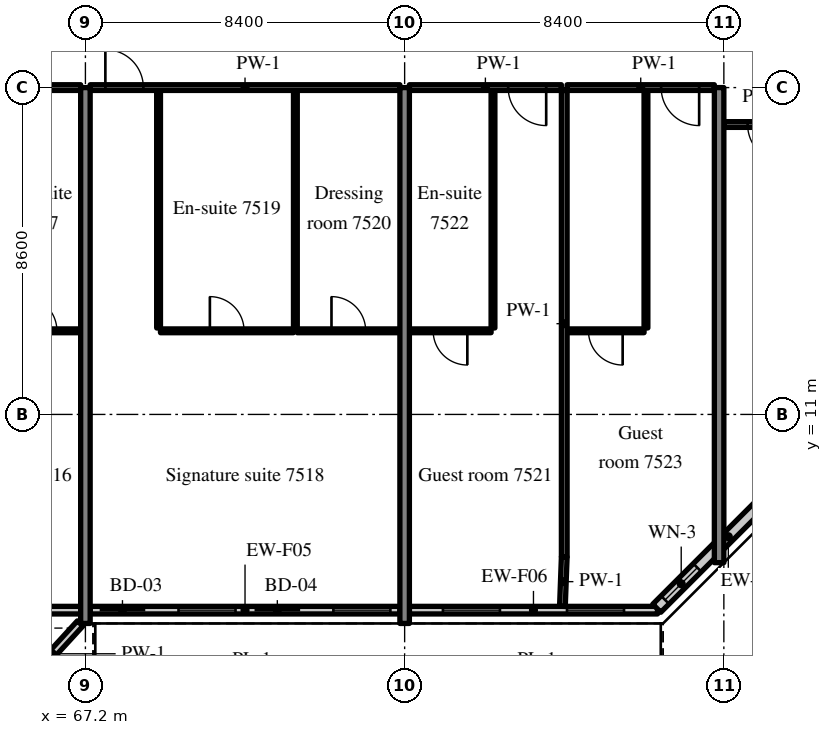
"""IFC4 building model, lengths in metres.
Left out: names, types, materials, properties, quantities, classifications, styles, units other than length and angle.
Written with IfcOpenShell. Run it as: python <this file> out.ifc"""

import sys

from ifc_helpers import new_model, si_unit, direction, frame, frame_2d, origin, place, context, subcontext, project, spatial, rectangle, extrude, source, transform, mapped, element, fill, save


model = new_model("IFC4")
c1 = context("Model", 3, precision=1e-05, world=origin(), true_north=direction((0.0, 1.0)))
c2 = subcontext(c1, "Body", "Model", "MODEL_VIEW")
j1 = project(units=[si_unit("LENGTHUNIT", "METRE"), si_unit("PLANEANGLEUNIT", "RADIAN")], contexts=[c1])
p1 = place(None, origin())
s1 = spatial("IfcSite", under=j1, at=p1, CompositionType="ELEMENT")
p2 = place(p1, origin())
s2 = spatial("IfcBuilding", under=s1, at=p2, CompositionType="ELEMENT")
p3 = place(p2, frame((0.0, 0.0, 313.7)))
s3 = spatial("IfcBuildingStorey", under=s2, at=p3, CompositionType="ELEMENT", Elevation=313.7)
m1 = source(origin(), c2, "Body", "SweptSolid", [
    extrude(rectangle(XDim=14.1, YDim=0.25, at=frame_2d((7.05, 0.0))), origin(), (0.0, 0.0, 1.0), 3.72),
])
for number, where, z_axis, x_axis in (
    (1, (67.2, 5.5, 0.0), (0.0, 0.0, 1.0), (0.0, 1.0, 0.0)),
    (2, (75.6, 5.5, 0.0), (0.0, 0.0, 1.0), (0.0, 1.0, 0.0)),
):
    element("IfcWall", number, at=place(p3, frame(where, z_axis=z_axis, x_axis=x_axis)), inside=s3, PredefinedType="SHEAR", context=c2, shape_type="MappedRepresentation", body=[
        mapped(m1, transform((0.0, 0.0, 0.0), scale=1.0)),
    ])
m2 = source(origin(), c2, "Body", "SweptSolid", [
    extrude(rectangle(XDim=12.5, YDim=0.25, at=frame_2d((6.25, 0.0))), origin(), (0.0, 0.0, 1.0), 3.72),
])
p4 = place(p3, frame((83.875, 7.1, 0.0), z_axis=(0.0, 0.0, 1.0), x_axis=(0.0, 1.0, 0.0)))
e3 = element("IfcWall", 3, at=p4, inside=s3, PredefinedType="SHEAR", context=c2, shape_type="MappedRepresentation", body=[
    mapped(m2, transform((0.0, 0.0, 0.0), scale=1.0)),
])
m3 = source(origin(), c2, "Body", "SweptSolid", [
    extrude(rectangle(XDim=3.642, YDim=0.2, at=frame_2d((1.821, 0.0))), origin(), (0.0, 0.0, 1.0), 3.17),
])
p5 = place(p3, frame((63.433, 5.85, 0.0), z_axis=(0.0, 0.0, 1.0), x_axis=(1.0, 0.0, 0.0)))
e4 = element("IfcWall", 4, at=p5, inside=s3, PredefinedType="SOLIDWALL", context=c2, shape_type="MappedRepresentation", body=[
    mapped(m3, transform((0.0, 0.0, 0.0), scale=1.0)),
])
m4 = source(origin(), c2, "Body", "SweptSolid", [
    extrude(rectangle(XDim=1.5, YDim=1.5, at=frame_2d((0.75, 0.75))), frame((0.0, 0.11, 0.0), z_axis=(0.0, -1.0, 0.0), x_axis=(1.0, 0.0, 0.0)), (0.0, 0.0, 1.0), 0.22),
])
p6 = place(p5, frame((1.071, 0.0, 0.9)))
e5 = element("IfcOpeningElement", 5, at=p6, cuts=e4, PredefinedType="OPENING", context=c2, shape_type="MappedRepresentation", body=[
    mapped(m4, transform((0.0, 0.0, 0.0), scale=1.0)),
])
m5 = source(origin(), c2, "Body", "SweptSolid", [
    extrude(rectangle(XDim=8.15, YDim=0.2, at=frame_2d((4.075, 0.0))), origin(), (0.0, 0.0, 1.0), 3.17),
])
p7 = place(p3, frame((67.325, 5.85, 0.0), z_axis=(0.0, 0.0, 1.0), x_axis=(1.0, 0.0, 0.0)))
e6 = element("IfcWall", 6, at=p7, inside=s3, PredefinedType="SOLIDWALL", context=c2, shape_type="MappedRepresentation", body=[
    mapped(m5, transform((0.0, 0.0, 0.0), scale=1.0)),
])
m6 = source(origin(), c2, "Body", "SweptSolid", [
    extrude(rectangle(XDim=1.2, YDim=2.4, at=frame_2d((0.6, 1.2))), frame((0.0, 0.11, 0.0), z_axis=(0.0, -1.0, 0.0), x_axis=(1.0, 0.0, 0.0)), (0.0, 0.0, 1.0), 0.22),
])
p8 = place(p7, frame((0.25, 0.0, 0.0)))
e7 = element("IfcOpeningElement", 7, at=p8, cuts=e6, PredefinedType="OPENING", context=c2, shape_type="MappedRepresentation", body=[
    mapped(m6, transform((0.0, 0.0, 0.0), scale=1.0)),
])
p9 = place(p7, frame((2.325, 0.0, 0.9)))
e8 = element("IfcOpeningElement", 8, at=p9, cuts=e6, PredefinedType="OPENING", context=c2, shape_type="MappedRepresentation", body=[
    mapped(m4, transform((0.0, 0.0, 0.0), scale=1.0)),
])
p10 = place(p7, frame((4.325, 0.0, 0.0)))
e9 = element("IfcOpeningElement", 9, at=p10, cuts=e6, PredefinedType="OPENING", context=c2, shape_type="MappedRepresentation", body=[
    mapped(m6, transform((0.0, 0.0, 0.0), scale=1.0)),
])
p11 = place(p7, frame((6.4, 0.0, 0.9)))
e10 = element("IfcOpeningElement", 10, at=p11, cuts=e6, PredefinedType="OPENING", context=c2, shape_type="MappedRepresentation", body=[
    mapped(m4, transform((0.0, 0.0, 0.0), scale=1.0)),
])
m7 = source(origin(), c2, "Body", "SweptSolid", [
    extrude(rectangle(XDim=6.53, YDim=0.2, at=frame_2d((3.265, 0.0))), origin(), (0.0, 0.0, 1.0), 3.17),
])
p12 = place(p3, frame((75.725, 5.85, 0.0), z_axis=(0.0, 0.0, 1.0), x_axis=(1.0, 0.0, 0.0)))
e11 = element("IfcWall", 11, at=p12, inside=s3, PredefinedType="SOLIDWALL", context=c2, shape_type="MappedRepresentation", body=[
    mapped(m7, transform((0.0, 0.0, 0.0), scale=1.0)),
])
p13 = place(p12, frame((0.883, 0.0, 0.9)))
e12 = element("IfcOpeningElement", 12, at=p13, cuts=e11, PredefinedType="OPENING", context=c2, shape_type="MappedRepresentation", body=[
    mapped(m4, transform((0.0, 0.0, 0.0), scale=1.0)),
])
p14 = place(p12, frame((4.147, 0.0, 0.9)))
e13 = element("IfcOpeningElement", 13, at=p14, cuts=e11, PredefinedType="OPENING", context=c2, shape_type="MappedRepresentation", body=[
    mapped(m4, transform((0.0, 0.0, 0.0), scale=1.0)),
])
m8 = source(origin(), c2, "Body", "SweptSolid", [
    extrude(rectangle(XDim=5.326, YDim=0.3, at=frame_2d((2.663, 0.0))), origin(), (0.0, 0.0, 1.0), 3.72),
])
p15 = place(p3, frame((82.234, 5.9, 0.0), z_axis=(0.0, 0.0, 1.0), x_axis=(0.707083859269, 0.707129702361, 0.0)))
e14 = element("IfcWall", 14, at=p15, inside=s3, PredefinedType="SOLIDWALL", context=c2, shape_type="MappedRepresentation", body=[
    mapped(m8, transform((0.0, 0.0, 0.0), scale=1.0)),
])
m9 = source(origin(), c2, "Body", "SweptSolid", [
    extrude(rectangle(XDim=1.2, YDim=1.5, at=frame_2d((0.6, 0.75))), frame((0.0, 0.16, 0.0), z_axis=(0.0, -1.0, 0.0), x_axis=(1.0, 0.0, 0.0)), (0.0, 0.0, 1.0), 0.32),
])
p16 = place(p15, frame((0.31, 0.0, 0.9)))
e15 = element("IfcOpeningElement", 15, at=p16, cuts=e14, PredefinedType="OPENING", context=c2, shape_type="MappedRepresentation", body=[
    mapped(m9, transform((0.0, 0.0, 0.0), scale=1.0)),
])
m10 = source(origin(), c2, "Body", "SweptSolid", [
    extrude(rectangle(XDim=2.164, YDim=0.2, at=frame_2d((1.082, 0.0))), origin(), (0.0, 0.0, 1.0), 1.1),
])
p17 = place(p3, frame((67.062, 5.5, -0.05), z_axis=(0.0, 0.0, 1.0), x_axis=(-0.675280003013, -0.737561466951, 0.0)))
e16 = element("IfcWall", 16, at=p17, inside=s3, PredefinedType="PARAPET", context=c2, shape_type="MappedRepresentation", body=[
    mapped(m10, transform((0.0, 0.0, 0.0), scale=1.0)),
])
m11 = source(origin(), c2, "Body", "SweptSolid", [
    extrude(rectangle(XDim=2.15, YDim=0.1, at=frame_2d((1.075, 0.0))), origin(), (0.0, 0.0, 1.0), 3.72),
])
p18 = place(p3, frame((64.925, 13.2, 0.0), z_axis=(0.0, 0.0, 1.0), x_axis=(1.0, 0.0, 0.0)))
e17 = element("IfcWall", 17, at=p18, inside=s3, PredefinedType="PARTITIONING", context=c2, shape_type="MappedRepresentation", body=[
    mapped(m11, transform((0.0, 0.0, 0.0), scale=1.0)),
])
m12 = source(origin(), c2, "Body", "SweptSolid", [
    extrude(rectangle(XDim=0.9, YDim=2.1, at=frame_2d((0.45, 1.05))), frame((0.0, 0.06, 0.0), z_axis=(0.0, -1.0, 0.0), x_axis=(1.0, 0.0, 0.0)), (0.0, 0.0, 1.0), 0.12),
])
p19 = place(p18, frame((0.625, 0.0, 0.0)))
e18 = element("IfcOpeningElement", 18, at=p19, cuts=e17, PredefinedType="OPENING", context=c2, shape_type="MappedRepresentation", body=[
    mapped(m12, transform((0.0, 0.0, 0.0), scale=1.0)),
])
m13 = source(origin(), c2, "Body", "SweptSolid", [
    extrude(rectangle(XDim=4.0, YDim=0.15, at=frame_2d((2.0, 0.0))), origin(), (0.0, 0.0, 1.0), 3.02),
])
p20 = place(p3, frame((63.075, 19.6, 0.0), z_axis=(0.0, 0.0, 1.0), x_axis=(1.0, 0.0, 0.0)))
e19 = element("IfcWall", 19, at=p20, inside=s3, PredefinedType="PARTITIONING", context=c2, shape_type="MappedRepresentation", body=[
    mapped(m13, transform((0.0, 0.0, 0.0), scale=1.0)),
])
m14 = source(origin(), c2, "Body", "SweptSolid", [
    extrude(rectangle(XDim=1.0, YDim=2.1, at=frame_2d((0.5, 1.05))), frame((0.0, 0.085, 0.0), z_axis=(0.0, -1.0, 0.0), x_axis=(1.0, 0.0, 0.0)), (0.0, 0.0, 1.0), 0.17),
])
p21 = place(p20, frame((0.4, 0.0, 0.0)))
e20 = element("IfcOpeningElement", 20, at=p21, cuts=e19, PredefinedType="OPENING", context=c2, shape_type="MappedRepresentation", body=[
    mapped(m14, transform((0.0, 0.0, 0.0), scale=1.0)),
])
m15 = source(origin(), c2, "Body", "SweptSolid", [
    extrude(rectangle(XDim=6.25, YDim=0.1, at=frame_2d((3.125, 0.0))), origin(), (0.0, 0.0, 1.0), 3.72),
])
for number, where, z_axis, x_axis in (
    (21, (69.125, 13.275, 0.0), (0.0, 0.0, 1.0), (0.0, 1.0, 0.0)),
    (22, (72.725, 13.275, 0.0), (0.0, 0.0, 1.0), (0.0, 1.0, 0.0)),
):
    element("IfcWall", number, at=place(p3, frame(where, z_axis=z_axis, x_axis=x_axis)), inside=s3, PredefinedType="PARTITIONING", context=c2, shape_type="MappedRepresentation", body=[
        mapped(m15, transform((0.0, 0.0, 0.0), scale=1.0)),
    ])
m16 = source(origin(), c2, "Body", "SweptSolid", [
    extrude(rectangle(XDim=3.5, YDim=0.1, at=frame_2d((1.75, 0.0))), origin(), (0.0, 0.0, 1.0), 3.72),
])
p22 = place(p3, frame((69.175, 13.2, 0.0), z_axis=(0.0, 0.0, 1.0), x_axis=(1.0, 0.0, 0.0)))
e23 = element("IfcWall", 23, at=p22, inside=s3, PredefinedType="PARTITIONING", context=c2, shape_type="MappedRepresentation", body=[
    mapped(m16, transform((0.0, 0.0, 0.0), scale=1.0)),
])
p23 = place(p22, frame((1.3, 0.0, 0.0)))
e24 = element("IfcOpeningElement", 24, at=p23, cuts=e23, PredefinedType="OPENING", context=c2, shape_type="MappedRepresentation", body=[
    mapped(m12, transform((0.0, 0.0, 0.0), scale=1.0)),
])
m17 = source(origin(), c2, "Body", "SweptSolid", [
    extrude(rectangle(XDim=2.7, YDim=0.1, at=frame_2d((1.35, 0.0))), origin(), (0.0, 0.0, 1.0), 3.72),
])
p24 = place(p3, frame((72.775, 13.2, 0.0), z_axis=(0.0, 0.0, 1.0), x_axis=(1.0, 0.0, 0.0)))
e25 = element("IfcWall", 25, at=p24, inside=s3, PredefinedType="PARTITIONING", context=c2, shape_type="MappedRepresentation", body=[
    mapped(m17, transform((0.0, 0.0, 0.0), scale=1.0)),
])
p25 = place(p24, frame((0.9, 0.0, 0.0)))
e26 = element("IfcOpeningElement", 26, at=p25, cuts=e25, PredefinedType="OPENING", context=c2, shape_type="MappedRepresentation", body=[
    mapped(m12, transform((0.0, 0.0, 0.0), scale=1.0)),
])
m18 = source(origin(), c2, "Body", "SweptSolid", [
    extrude(rectangle(XDim=8.15, YDim=0.15, at=frame_2d((4.075, 0.0))), origin(), (0.0, 0.0, 1.0), 3.02),
])
p26 = place(p3, frame((67.325, 19.6, 0.0), z_axis=(0.0, 0.0, 1.0), x_axis=(1.0, 0.0, 0.0)))
e27 = element("IfcWall", 27, at=p26, inside=s3, PredefinedType="PARTITIONING", context=c2, shape_type="MappedRepresentation", body=[
    mapped(m18, transform((0.0, 0.0, 0.0), scale=1.0)),
])
p27 = place(p26, frame((0.4, 0.0, 0.0)))
e28 = element("IfcOpeningElement", 28, at=p27, cuts=e27, PredefinedType="OPENING", context=c2, shape_type="MappedRepresentation", body=[
    mapped(m14, transform((0.0, 0.0, 0.0), scale=1.0)),
])
p28 = place(p3, frame((77.925, 13.275, 0.0), z_axis=(0.0, 0.0, 1.0), x_axis=(0.0, 1.0, 0.0)))
e29 = element("IfcWall", 29, at=p28, inside=s3, PredefinedType="PARTITIONING", context=c2, shape_type="MappedRepresentation", body=[
    mapped(m15, transform((0.0, 0.0, 0.0), scale=1.0)),
])
p29 = place(p3, frame((75.725, 13.2, 0.0), z_axis=(0.0, 0.0, 1.0), x_axis=(1.0, 0.0, 0.0)))
e30 = element("IfcWall", 30, at=p29, inside=s3, PredefinedType="PARTITIONING", context=c2, shape_type="MappedRepresentation", body=[
    mapped(m11, transform((0.0, 0.0, 0.0), scale=1.0)),
])
p30 = place(p29, frame((0.625, 0.0, 0.0)))
e31 = element("IfcOpeningElement", 31, at=p30, cuts=e30, PredefinedType="OPENING", context=c2, shape_type="MappedRepresentation", body=[
    mapped(m12, transform((0.0, 0.0, 0.0), scale=1.0)),
])
p31 = place(p3, frame((75.725, 19.6, 0.0), z_axis=(0.0, 0.0, 1.0), x_axis=(1.0, 0.0, 0.0)))
e32 = element("IfcWall", 32, at=p31, inside=s3, PredefinedType="PARTITIONING", context=c2, shape_type="MappedRepresentation", body=[
    mapped(m13, transform((0.0, 0.0, 0.0), scale=1.0)),
])
p32 = place(p31, frame((2.6, 0.0, 0.0)))
e33 = element("IfcOpeningElement", 33, at=p32, cuts=e32, PredefinedType="OPENING", context=c2, shape_type="MappedRepresentation", body=[
    mapped(m14, transform((0.0, 0.0, 0.0), scale=1.0)),
])
p33 = place(p3, frame((81.95, 13.275, 0.0), z_axis=(0.0, 0.0, 1.0), x_axis=(0.0, 1.0, 0.0)))
e34 = element("IfcWall", 34, at=p33, inside=s3, PredefinedType="PARTITIONING", context=c2, shape_type="MappedRepresentation", body=[
    mapped(m15, transform((0.0, 0.0, 0.0), scale=1.0)),
])
m19 = source(origin(), c2, "Body", "SweptSolid", [
    extrude(rectangle(XDim=2.025, YDim=0.1, at=frame_2d((1.012, 0.0))), origin(), (0.0, 0.0, 1.0), 3.72),
])
p34 = place(p3, frame((79.875, 13.2, 0.0), z_axis=(0.0, 0.0, 1.0), x_axis=(1.0, 0.0, 0.0)))
e35 = element("IfcWall", 35, at=p34, inside=s3, PredefinedType="PARTITIONING", context=c2, shape_type="MappedRepresentation", body=[
    mapped(m19, transform((0.0, 0.0, 0.0), scale=1.0)),
])
p35 = place(p34, frame((0.562, 0.0, 0.0)))
e36 = element("IfcOpeningElement", 36, at=p35, cuts=e35, PredefinedType="OPENING", context=c2, shape_type="MappedRepresentation", body=[
    mapped(m12, transform((0.0, 0.0, 0.0), scale=1.0)),
])
m20 = source(origin(), c2, "Body", "SweptSolid", [
    extrude(rectangle(XDim=3.875, YDim=0.15, at=frame_2d((1.938, 0.0))), origin(), (0.0, 0.0, 1.0), 3.02),
])
p36 = place(p3, frame((79.875, 19.6, 0.0), z_axis=(0.0, 0.0, 1.0), x_axis=(1.0, 0.0, 0.0)))
e37 = element("IfcWall", 37, at=p36, inside=s3, PredefinedType="PARTITIONING", context=c2, shape_type="MappedRepresentation", body=[
    mapped(m20, transform((0.0, 0.0, 0.0), scale=1.0)),
])
p37 = place(p36, frame((2.475, 0.0, 0.0)))
e38 = element("IfcOpeningElement", 38, at=p37, cuts=e37, PredefinedType="OPENING", context=c2, shape_type="MappedRepresentation", body=[
    mapped(m14, transform((0.0, 0.0, 0.0), scale=1.0)),
])
m21 = source(origin(), c2, "Body", "SweptSolid", [
    extrude(rectangle(XDim=12.275, YDim=0.15, at=frame_2d((6.137, 0.0))), origin(), (0.0, 0.0, 1.0), 3.72),
])
p38 = place(p3, frame((79.8, 7.25, 0.0), z_axis=(0.0, 0.0, 1.0), x_axis=(0.0, 1.0, 0.0)))
e39 = element("IfcWall", 39, at=p38, inside=s3, PredefinedType="PARTITIONING", context=c2, shape_type="MappedRepresentation", body=[
    mapped(m21, transform((0.0, 0.0, 0.0), scale=1.0)),
])
m22 = source(origin(), c2, "Body", "SweptSolid", [
    extrude(rectangle(XDim=1.9, YDim=0.15, at=frame_2d((0.95, 0.0))), origin(), (0.0, 0.0, 1.0), 3.02),
])
p39 = place(p3, frame((84.0, 18.628, 0.0), z_axis=(0.0, 0.0, 1.0), x_axis=(1.0, 0.0, 0.0)))
e40 = element("IfcWall", 40, at=p39, inside=s3, PredefinedType="PARTITIONING", context=c2, shape_type="MappedRepresentation", body=[
    mapped(m22, transform((0.0, 0.0, 0.0), scale=1.0)),
])
p40 = place(p39, frame((0.625, 0.0, 0.0)))
e41 = element("IfcOpeningElement", 41, at=p40, cuts=e40, PredefinedType="OPENING", context=c2, shape_type="MappedRepresentation", body=[
    mapped(m14, transform((0.0, 0.0, 0.0), scale=1.0)),
])
m23 = source(origin(), c2, "Body", "SweptSolid", [
    extrude(rectangle(XDim=1.301, YDim=0.15, at=frame_2d((0.65, 0.0))), origin(), (0.0, 0.0, 1.0), 3.72),
])
p41 = place(p3, frame((79.752, 5.95, 0.0), z_axis=(0.0, 0.0, 1.0), x_axis=(0.036970014262, 0.999316375351, 0.0)))
e42 = element("IfcWall", 42, at=p41, inside=s3, PredefinedType="PARTITIONING", context=c2, shape_type="MappedRepresentation", body=[
    mapped(m23, transform((0.0, 0.0, 0.0), scale=1.0)),
])
m24 = source(origin(), c2, "Body", "SweptSolid", [
    extrude(rectangle(XDim=1.2, YDim=2.4, at=frame_2d((0.6, 1.2))), frame((0.0, 0.025, 0.0), z_axis=(0.0, -1.0, 0.0), x_axis=(1.0, 0.0, 0.0)), (0.0, 0.0, 1.0), 0.05),
])
p42 = place(p8, origin())
e43 = element("IfcDoor", 43, at=p42, inside=s3, OperationType="SLIDING_TO_LEFT", PredefinedType="DOOR", context=c2, shape_type="MappedRepresentation", body=[
    mapped(m24, transform((0.0, 0.0, 0.0), scale=1.0)),
])
fill(e7, e43)
m25 = source(origin(), c2, "Body", "SweptSolid", [
    extrude(rectangle(XDim=1.5, YDim=1.5, at=frame_2d((0.75, 0.75))), frame((0.0, 0.03, 0.0), z_axis=(0.0, -1.0, 0.0), x_axis=(1.0, 0.0, 0.0)), (0.0, 0.0, 1.0), 0.06),
])
p43 = place(p9, origin())
e44 = element("IfcWindow", 44, at=p43, inside=s3, PartitioningType="SINGLE_PANEL", PredefinedType="WINDOW", context=c2, shape_type="MappedRepresentation", body=[
    mapped(m25, transform((0.0, 0.0, 0.0), scale=1.0)),
])
fill(e8, e44)
p44 = place(p10, origin())
e45 = element("IfcDoor", 45, at=p44, inside=s3, OperationType="SLIDING_TO_RIGHT", PredefinedType="DOOR", context=c2, shape_type="MappedRepresentation", body=[
    mapped(m24, transform((0.0, 0.0, 0.0), scale=1.0)),
])
fill(e9, e45)
p45 = place(p11, origin())
e46 = element("IfcWindow", 46, at=p45, inside=s3, PartitioningType="SINGLE_PANEL", PredefinedType="WINDOW", context=c2, shape_type="MappedRepresentation", body=[
    mapped(m25, transform((0.0, 0.0, 0.0), scale=1.0)),
])
fill(e10, e46)
p46 = place(p13, origin())
e47 = element("IfcWindow", 47, at=p46, inside=s3, PartitioningType="SINGLE_PANEL", PredefinedType="WINDOW", context=c2, shape_type="MappedRepresentation", body=[
    mapped(m25, transform((0.0, 0.0, 0.0), scale=1.0)),
])
fill(e12, e47)
p47 = place(p14, origin())
e48 = element("IfcWindow", 48, at=p47, inside=s3, PartitioningType="SINGLE_PANEL", PredefinedType="WINDOW", context=c2, shape_type="MappedRepresentation", body=[
    mapped(m25, transform((0.0, 0.0, 0.0), scale=1.0)),
])
fill(e13, e48)
m26 = source(origin(), c2, "Body", "SweptSolid", [
    extrude(rectangle(XDim=1.2, YDim=1.5, at=frame_2d((0.6, 0.75))), frame((0.0, 0.03, 0.0), z_axis=(0.0, -1.0, 0.0), x_axis=(1.0, 0.0, 0.0)), (0.0, 0.0, 1.0), 0.06),
])
p48 = place(p16, origin())
e49 = element("IfcWindow", 49, at=p48, inside=s3, PartitioningType="SINGLE_PANEL", PredefinedType="WINDOW", context=c2, shape_type="MappedRepresentation", body=[
    mapped(m26, transform((0.0, 0.0, 0.0), scale=1.0)),
])
fill(e15, e49)
m27 = source(origin(), c2, "Body", "SweptSolid", [
    extrude(rectangle(XDim=0.9, YDim=2.1, at=frame_2d((0.45, 1.05))), frame((0.0, 0.025, 0.0), z_axis=(0.0, -1.0, 0.0), x_axis=(1.0, 0.0, 0.0)), (0.0, 0.0, 1.0), 0.05),
])
p49 = place(p19, origin())
e50 = element("IfcDoor", 50, at=p49, inside=s3, OperationType="SINGLE_SWING_LEFT", PredefinedType="DOOR", context=c2, shape_type="MappedRepresentation", body=[
    mapped(m27, transform((0.0, 0.0, 0.0), scale=1.0)),
])
fill(e18, e50)
p50 = place(p23, origin())
e51 = element("IfcDoor", 51, at=p50, inside=s3, OperationType="SINGLE_SWING_LEFT", PredefinedType="DOOR", context=c2, shape_type="MappedRepresentation", body=[
    mapped(m27, transform((0.0, 0.0, 0.0), scale=1.0)),
])
fill(e24, e51)
p51 = place(p25, origin())
e52 = element("IfcDoor", 52, at=p51, inside=s3, OperationType="SINGLE_SWING_LEFT", PredefinedType="DOOR", context=c2, shape_type="MappedRepresentation", body=[
    mapped(m27, transform((0.0, 0.0, 0.0), scale=1.0)),
])
fill(e26, e52)
m28 = source(origin(), c2, "Body", "SweptSolid", [
    extrude(rectangle(XDim=1.0, YDim=2.1, at=frame_2d((0.5, 1.05))), frame((0.0, 0.025, 0.0), z_axis=(0.0, -1.0, 0.0), x_axis=(1.0, 0.0, 0.0)), (0.0, 0.0, 1.0), 0.05),
])
p52 = place(p27, origin())
e53 = element("IfcDoor", 53, at=p52, inside=s3, OperationType="SINGLE_SWING_LEFT", PredefinedType="DOOR", context=c2, shape_type="MappedRepresentation", body=[
    mapped(m28, transform((0.0, 0.0, 0.0), scale=1.0)),
])
fill(e28, e53)
p53 = place(p30, origin())
e54 = element("IfcDoor", 54, at=p53, inside=s3, OperationType="SINGLE_SWING_RIGHT", PredefinedType="DOOR", context=c2, shape_type="MappedRepresentation", body=[
    mapped(m27, transform((0.0, 0.0, 0.0), scale=1.0)),
])
fill(e31, e54)
p54 = place(p32, origin())
e55 = element("IfcDoor", 55, at=p54, inside=s3, OperationType="SINGLE_SWING_RIGHT", PredefinedType="DOOR", context=c2, shape_type="MappedRepresentation", body=[
    mapped(m28, transform((0.0, 0.0, 0.0), scale=1.0)),
])
fill(e33, e55)
p55 = place(p35, origin())
e56 = element("IfcDoor", 56, at=p55, inside=s3, OperationType="SINGLE_SWING_RIGHT", PredefinedType="DOOR", context=c2, shape_type="MappedRepresentation", body=[
    mapped(m27, transform((0.0, 0.0, 0.0), scale=1.0)),
])
fill(e36, e56)
p56 = place(p37, origin())
e57 = element("IfcDoor", 57, at=p56, inside=s3, OperationType="SINGLE_SWING_RIGHT", PredefinedType="DOOR", context=c2, shape_type="MappedRepresentation", body=[
    mapped(m28, transform((0.0, 0.0, 0.0), scale=1.0)),
])
fill(e38, e57)
p57 = place(p40, origin())
e58 = element("IfcDoor", 58, at=p57, inside=s3, OperationType="SINGLE_SWING_RIGHT", PredefinedType="DOOR", context=c2, shape_type="MappedRepresentation", body=[
    mapped(m28, transform((0.0, 0.0, 0.0), scale=1.0)),
])
fill(e41, e58)
save(model, sys.argv[1])
